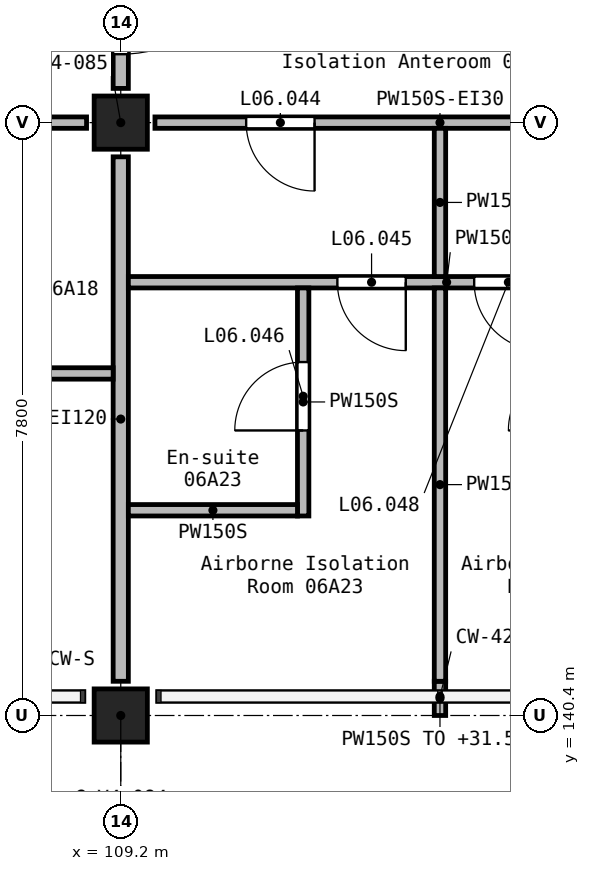
"""IFC4 building model, lengths in metres.
Left out: names, types, materials, properties, quantities, classifications, styles, units other than length and angle.
Written with IfcOpenShell. Run it as: python <this file> out.ifc"""

import sys

from ifc_helpers import new_model, si_unit, direction, frame, frame_2d, origin, origin_2d, place, context, subcontext, project, spatial, rectangle, extrude, element, fill, save


model = new_model("IFC4")
c1 = context("Model", 3, precision=1e-05, world=origin(), true_north=direction((0.0, 1.0)))
c2 = subcontext(c1, "Body", "Model", "MODEL_VIEW")
j1 = project(units=[si_unit("LENGTHUNIT", "METRE"), si_unit("PLANEANGLEUNIT", "RADIAN")], contexts=[c1])
p1 = place(None, origin())
s1 = spatial("IfcSite", under=j1, at=p1, CompositionType="ELEMENT")
p2 = place(p1, origin())
s2 = spatial("IfcBuilding", under=s1, at=p2, CompositionType="ELEMENT")
p3 = place(p2, frame((0.0, 0.0, 28.8)))
s3 = spatial("IfcBuildingStorey", under=s2, at=p3, CompositionType="ELEMENT", Elevation=28.8)
for number, where, z_axis, x_axis in (
    (1, (109.2, 140.4, 0.0), (0.0, 0.0, 1.0), (1.0, 0.0, 0.0)),
    (2, (109.2, 148.2, 0.0), (0.0, 0.0, 1.0), (1.0, 0.0, 0.0)),
):
    element("IfcColumn", number, at=place(p3, frame(where, z_axis=z_axis, x_axis=x_axis)), inside=s3, PredefinedType="COLUMN", context=c2, shape_type="SweptSolid", body=[
        extrude(rectangle(XDim=0.7, YDim=0.7, at=origin_2d()), origin(), (0.0, 0.0, 1.0), 3.9),
    ])
p4 = place(p3, frame((109.2, 151.35, 0.0), z_axis=(0.0, 0.0, 1.0), x_axis=(0.0, -1.0, 0.0)))
e3 = element("IfcWall", 3, at=p4, inside=s3, PredefinedType="SOLIDWALL", context=c2, shape_type="SweptSolid", body=[
    extrude(rectangle(XDim=2.7, YDim=0.2, at=frame_2d((1.35, 0.0))), origin(), (0.0, 0.0, 1.0), 3.6),
])
p5 = place(p4, frame((0.45, 0.0, 0.0)))
e4 = element("IfcOpeningElement", 4, at=p5, cuts=e3, PredefinedType="OPENING", context=c2, shape_type="SweptSolid", body=[
    extrude(rectangle(XDim=1.8, YDim=2.1, at=frame_2d((0.9, 1.05))), frame((0.0, 0.11, 0.0), z_axis=(0.0, -1.0, 0.0), x_axis=(1.0, 0.0, 0.0)), (0.0, 0.0, 1.0), 0.22),
])
p6 = place(p3, frame((109.2, 147.75, 0.0), z_axis=(0.0, 0.0, 1.0), x_axis=(0.0, -1.0, 0.0)))
e5 = element("IfcWall", 5, at=p6, inside=s3, PredefinedType="SOLIDWALL", context=c2, shape_type="SweptSolid", body=[
    extrude(rectangle(XDim=6.9, YDim=0.2, at=frame_2d((3.45, 0.0))), origin(), (0.0, 0.0, 1.0), 3.6),
])
p7 = place(p3, frame((117.15, 148.2, 0.0), z_axis=(0.0, 0.0, 1.0), x_axis=(-1.0, 0.0, 0.0)))
e6 = element("IfcWall", 6, at=p7, inside=s3, PredefinedType="PARTITIONING", context=c2, shape_type="SweptSolid", body=[
    extrude(rectangle(XDim=7.5, YDim=0.15, at=frame_2d((3.75, 0.0))), origin(), (0.0, 0.0, 1.0), 3.6),
])
p8 = place(p7, frame((5.4, 0.0, 0.0)))
e7 = element("IfcOpeningElement", 7, at=p8, cuts=e6, PredefinedType="OPENING", context=c2, shape_type="SweptSolid", body=[
    extrude(rectangle(XDim=0.9, YDim=2.1, at=frame_2d((0.45, 1.05))), frame((0.0, 0.085, 0.0), z_axis=(0.0, -1.0, 0.0), x_axis=(1.0, 0.0, 0.0)), (0.0, 0.0, 1.0), 0.17),
])
p9 = place(p7, frame((1.2, 0.0, 0.0)))
e8 = element("IfcOpeningElement", 8, at=p9, cuts=e6, PredefinedType="OPENING", context=c2, shape_type="SweptSolid", body=[
    extrude(rectangle(XDim=0.9, YDim=2.1, at=frame_2d((0.45, 1.05))), frame((0.0, 0.085, 0.0), z_axis=(0.0, -1.0, 0.0), x_axis=(1.0, 0.0, 0.0)), (0.0, 0.0, 1.0), 0.17),
])
p10 = place(p3, frame((108.75, 148.2, 0.0), z_axis=(0.0, 0.0, 1.0), x_axis=(-1.0, 0.0, 0.0)))
e9 = element("IfcWall", 9, at=p10, inside=s3, PredefinedType="PARTITIONING", context=c2, shape_type="SweptSolid", body=[
    extrude(rectangle(XDim=5.925, YDim=0.15, at=frame_2d((2.962, 0.0))), origin(), (0.0, 0.0, 1.0), 3.6),
])
p11 = place(p10, frame((3.55, 0.0, 0.0)))
e10 = element("IfcOpeningElement", 10, at=p11, cuts=e9, PredefinedType="OPENING", context=c2, shape_type="SweptSolid", body=[
    extrude(rectangle(XDim=1.0, YDim=2.1, at=frame_2d((0.5, 1.05))), frame((0.0, 0.085, 0.0), z_axis=(0.0, -1.0, 0.0), x_axis=(1.0, 0.0, 0.0)), (0.0, 0.0, 1.0), 0.17),
])
p12 = place(p3, frame((117.675, 146.1, 0.0), z_axis=(0.0, 0.0, 1.0), x_axis=(-1.0, 0.0, 0.0)))
e11 = element("IfcWall", 11, at=p12, inside=s3, PredefinedType="PARTITIONING", context=c2, shape_type="SweptSolid", body=[
    extrude(rectangle(XDim=8.375, YDim=0.15, at=frame_2d((4.188, 0.0))), origin(), (0.0, 0.0, 1.0), 3.6),
])
p13 = place(p12, frame((4.725, 0.0, 0.0)))
e12 = element("IfcOpeningElement", 12, at=p13, cuts=e11, PredefinedType="OPENING", context=c2, shape_type="SweptSolid", body=[
    extrude(rectangle(XDim=0.9, YDim=2.1, at=frame_2d((0.45, 1.05))), frame((0.0, 0.085, 0.0), z_axis=(0.0, -1.0, 0.0), x_axis=(1.0, 0.0, 0.0)), (0.0, 0.0, 1.0), 0.17),
])
p14 = place(p12, frame((2.925, 0.0, 0.0)))
e13 = element("IfcOpeningElement", 13, at=p14, cuts=e11, PredefinedType="OPENING", context=c2, shape_type="SweptSolid", body=[
    extrude(rectangle(XDim=0.9, YDim=2.1, at=frame_2d((0.45, 1.05))), frame((0.0, 0.085, 0.0), z_axis=(0.0, -1.0, 0.0), x_axis=(1.0, 0.0, 0.0)), (0.0, 0.0, 1.0), 0.17),
])
p15 = place(p3, frame((113.4, 140.4, 0.0), z_axis=(0.0, 0.0, 1.0), x_axis=(0.0, 1.0, 0.0)))
e14 = element("IfcWall", 14, at=p15, inside=s3, PredefinedType="PARTITIONING", context=c2, shape_type="SweptSolid", body=[
    extrude(rectangle(XDim=0.45, YDim=0.15, at=frame_2d((0.225, 0.0))), origin(), (0.0, 0.0, 1.0), 2.78),
])
p16 = place(p3, frame((113.4, 140.85, 0.0), z_axis=(0.0, 0.0, 1.0), x_axis=(0.0, 1.0, 0.0)))
e15 = element("IfcWall", 15, at=p16, inside=s3, PredefinedType="PARTITIONING", context=c2, shape_type="SweptSolid", body=[
    extrude(rectangle(XDim=5.175, YDim=0.15, at=frame_2d((2.587, 0.0))), origin(), (0.0, 0.0, 1.0), 3.6),
])
p17 = place(p3, frame((113.4, 146.175, 0.0), z_axis=(0.0, 0.0, 1.0), x_axis=(0.0, 1.0, 0.0)))
e16 = element("IfcWall", 16, at=p17, inside=s3, PredefinedType="PARTITIONING", context=c2, shape_type="SweptSolid", body=[
    extrude(rectangle(XDim=1.95, YDim=0.15, at=frame_2d((0.975, 0.0))), origin(), (0.0, 0.0, 1.0), 3.6),
])
p18 = place(p3, frame((111.6, 143.025, 0.0), z_axis=(0.0, 0.0, 1.0), x_axis=(0.0, 1.0, 0.0)))
e17 = element("IfcWall", 17, at=p18, inside=s3, PredefinedType="PARTITIONING", context=c2, shape_type="SweptSolid", body=[
    extrude(rectangle(XDim=3.0, YDim=0.15, at=frame_2d((1.5, 0.0))), origin(), (0.0, 0.0, 1.0), 3.6),
])
p19 = place(p18, frame((1.125, 0.0, 0.0)))
e18 = element("IfcOpeningElement", 18, at=p19, cuts=e17, PredefinedType="OPENING", context=c2, shape_type="SweptSolid", body=[
    extrude(rectangle(XDim=0.9, YDim=2.1, at=frame_2d((0.45, 1.05))), frame((0.0, 0.085, 0.0), z_axis=(0.0, -1.0, 0.0), x_axis=(1.0, 0.0, 0.0)), (0.0, 0.0, 1.0), 0.17),
])
p20 = place(p3, frame((106.575, 144.9, 0.0), z_axis=(0.0, 0.0, 1.0), x_axis=(1.0, 0.0, 0.0)))
e19 = element("IfcWall", 19, at=p20, inside=s3, PredefinedType="PARTITIONING", context=c2, shape_type="SweptSolid", body=[
    extrude(rectangle(XDim=2.525, YDim=0.15, at=frame_2d((1.263, 0.0))), origin(), (0.0, 0.0, 1.0), 3.6),
])
p21 = place(p3, frame((109.3, 143.1, 0.0), z_axis=(0.0, 0.0, 1.0), x_axis=(1.0, 0.0, 0.0)))
e20 = element("IfcWall", 20, at=p21, inside=s3, PredefinedType="PARTITIONING", context=c2, shape_type="SweptSolid", body=[
    extrude(rectangle(XDim=2.225, YDim=0.15, at=frame_2d((1.112, 0.0))), origin(), (0.0, 0.0, 1.0), 3.6),
])
p22 = place(p5, origin())
e21 = element("IfcDoor", 21, at=p22, inside=s3, OperationType="DOUBLE_DOOR_SINGLE_SWING", PredefinedType="DOOR", context=c2, shape_type="SweptSolid", body=[
    extrude(rectangle(XDim=1.8, YDim=2.1, at=frame_2d((0.9, 1.05))), frame((0.0, 0.025, 0.0), z_axis=(0.0, -1.0, 0.0), x_axis=(1.0, 0.0, 0.0)), (0.0, 0.0, 1.0), 0.05),
])
fill(e4, e21)
p23 = place(p8, origin())
e22 = element("IfcDoor", 22, at=p23, inside=s3, OperationType="SINGLE_SWING_RIGHT", PredefinedType="DOOR", context=c2, shape_type="SweptSolid", body=[
    extrude(rectangle(XDim=0.9, YDim=2.1, at=frame_2d((0.45, 1.05))), frame((0.0, 0.025, 0.0), z_axis=(0.0, -1.0, 0.0), x_axis=(1.0, 0.0, 0.0)), (0.0, 0.0, 1.0), 0.05),
])
fill(e7, e22)
p24 = place(p13, origin())
e23 = element("IfcDoor", 23, at=p24, inside=s3, OperationType="SINGLE_SWING_RIGHT", PredefinedType="DOOR", context=c2, shape_type="SweptSolid", body=[
    extrude(rectangle(XDim=0.9, YDim=2.1, at=frame_2d((0.45, 1.05))), frame((0.0, 0.025, 0.0), z_axis=(0.0, -1.0, 0.0), x_axis=(1.0, 0.0, 0.0)), (0.0, 0.0, 1.0), 0.05),
])
fill(e12, e23)
p25 = place(p19, origin())
e24 = element("IfcDoor", 24, at=p25, inside=s3, OperationType="SINGLE_SWING_RIGHT", PredefinedType="DOOR", context=c2, shape_type="SweptSolid", body=[
    extrude(rectangle(XDim=0.9, YDim=2.1, at=frame_2d((0.45, 1.05))), frame((0.0, 0.025, 0.0), z_axis=(0.0, -1.0, 0.0), x_axis=(1.0, 0.0, 0.0)), (0.0, 0.0, 1.0), 0.05),
])
fill(e18, e24)
p26 = place(p14, origin())
e25 = element("IfcDoor", 25, at=p26, inside=s3, OperationType="SINGLE_SWING_LEFT", PredefinedType="DOOR", context=c2, shape_type="SweptSolid", body=[
    extrude(rectangle(XDim=0.9, YDim=2.1, at=frame_2d((0.45, 1.05))), frame((0.0, 0.025, 0.0), z_axis=(0.0, -1.0, 0.0), x_axis=(1.0, 0.0, 0.0)), (0.0, 0.0, 1.0), 0.05),
])
fill(e13, e25)
save(model, sys.argv[1])
